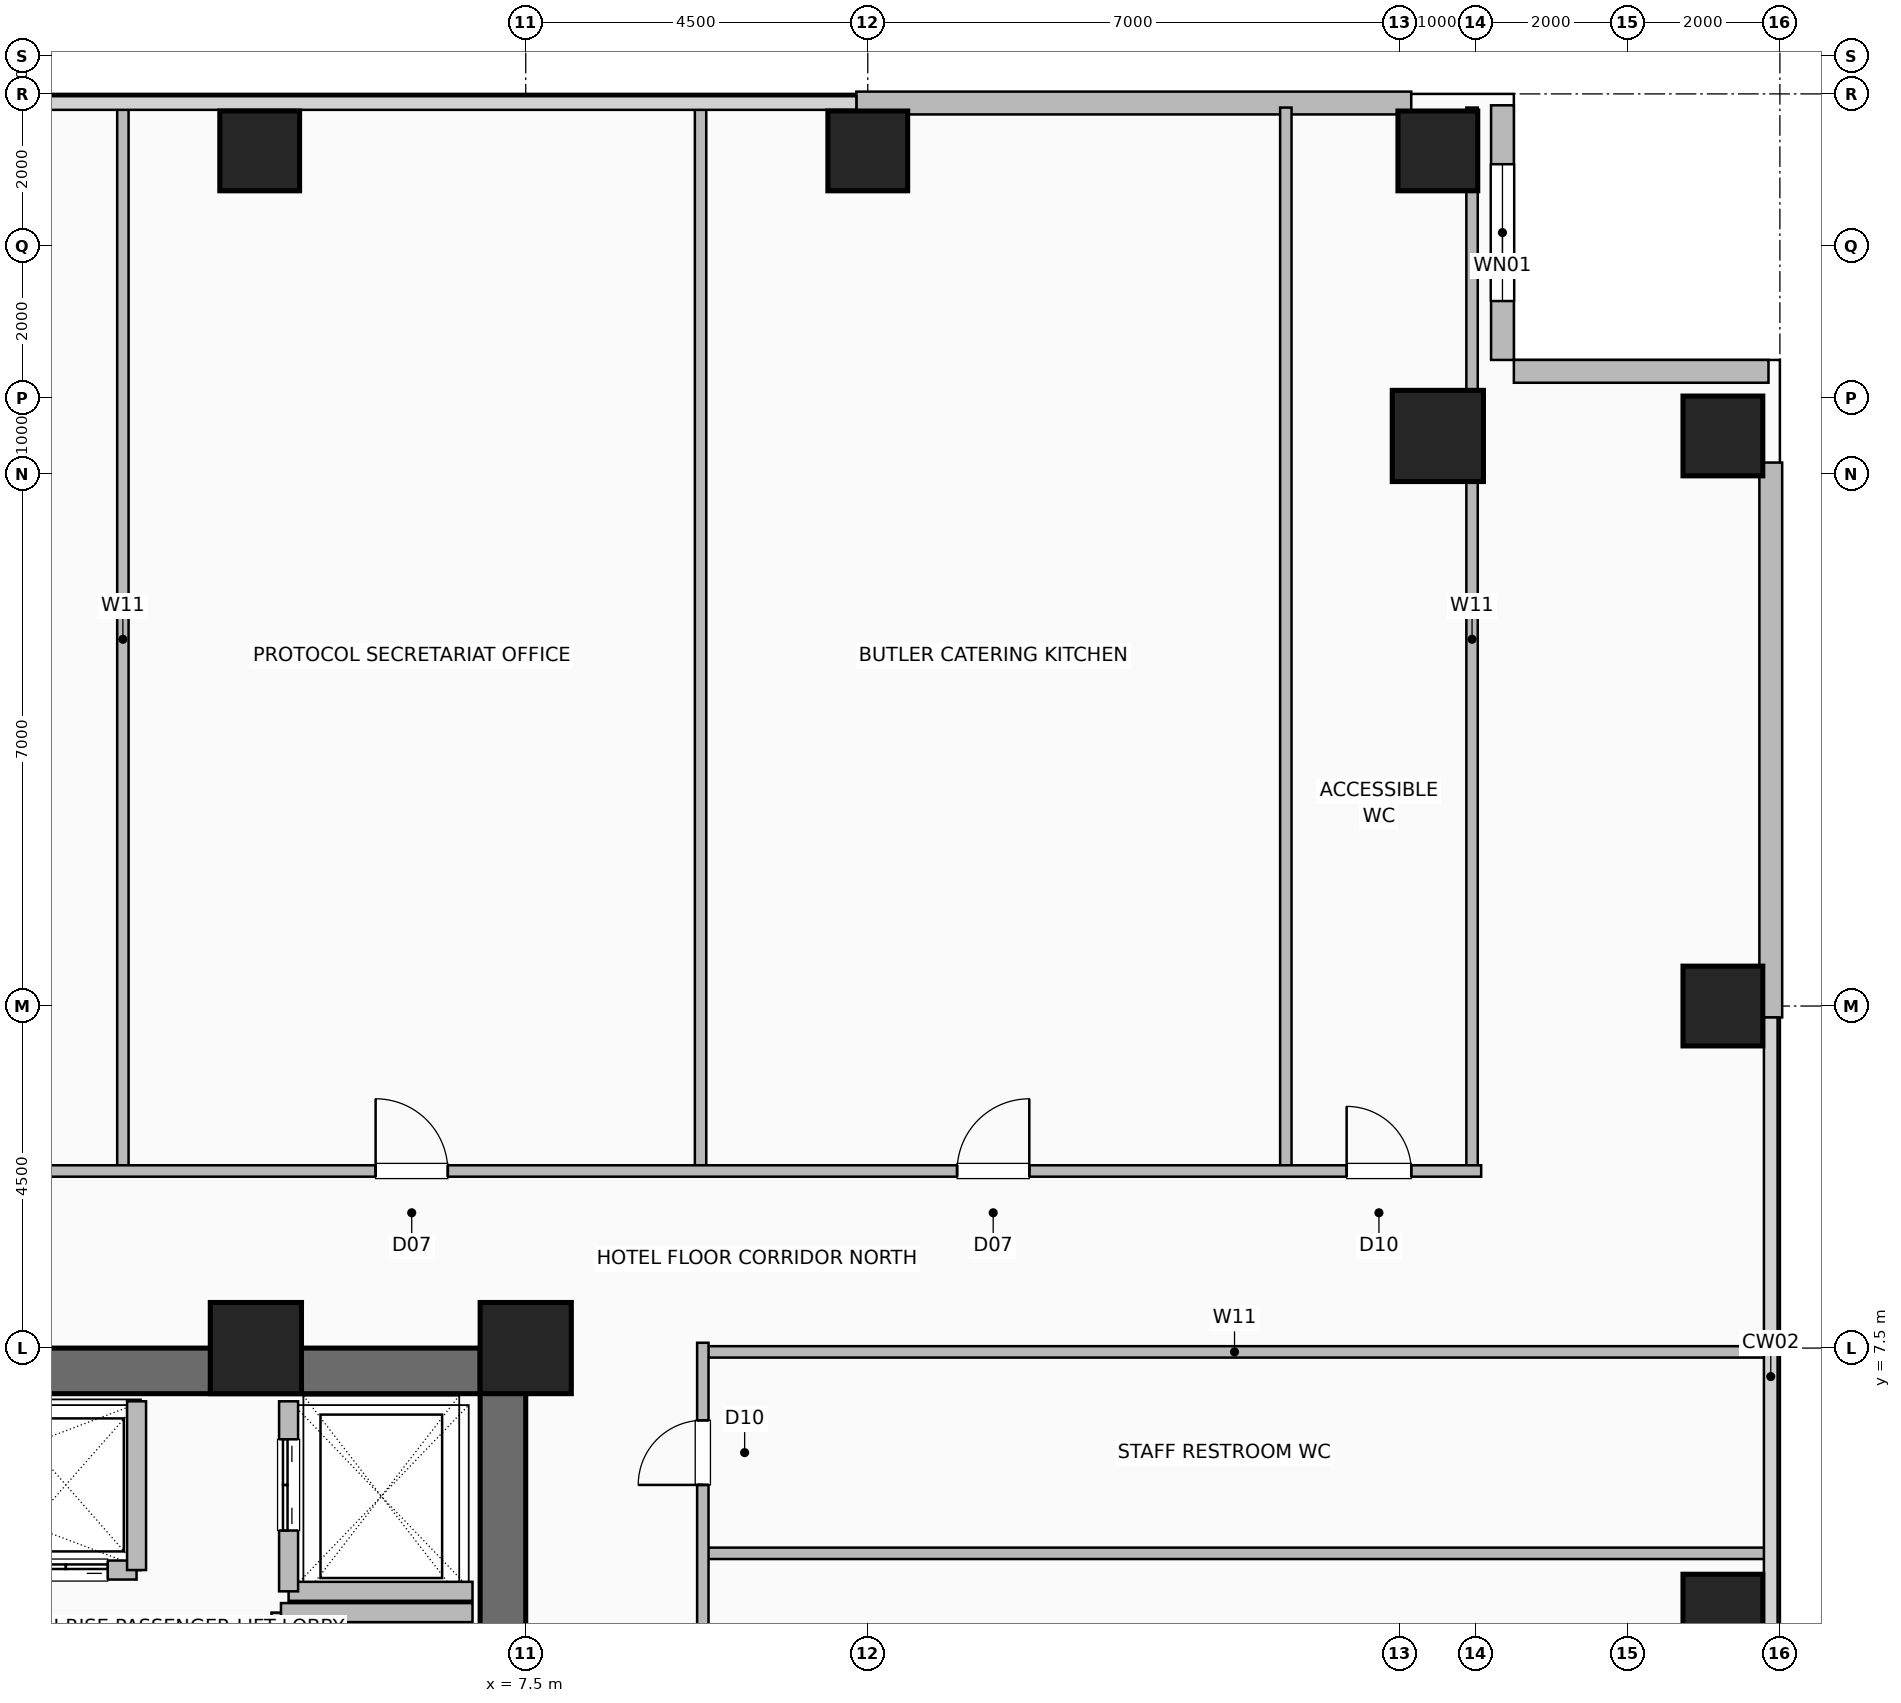
"""IFC4 building model, lengths in metres.
Left out: names, types, materials, properties, quantities, classifications, styles, units other than length and angle.
Written with IfcOpenShell. Run it as: python <this file> out.ifc"""

import sys

from ifc_helpers import new_model, si_unit, direction, frame, frame_2d, origin, origin_2d, place, context, subcontext, project, spatial, rectangle, hollow_rectangle, extrude, element, fill, save


model = new_model("IFC4")
c1 = context("Model", 3, precision=1e-05, world=origin(), true_north=direction((0.0, 1.0)))
c2 = subcontext(c1, "Body", "Model", "MODEL_VIEW")
j1 = project(units=[si_unit("LENGTHUNIT", "METRE"), si_unit("PLANEANGLEUNIT", "RADIAN")], contexts=[c1])
p1 = place(None, origin())
s1 = spatial("IfcSite", under=j1, at=p1, CompositionType="ELEMENT")
p2 = place(p1, origin())
s2 = spatial("IfcBuilding", under=s1, at=p2, CompositionType="ELEMENT")
p3 = place(p2, frame((0.0, 0.0, 76.0)))
s3 = spatial("IfcBuildingStorey", under=s2, at=p3, CompositionType="ELEMENT", Elevation=76.0)
for number, where, z_axis, x_axis in (
    (1, (7.5, 7.5, 0.0), (0.0, 0.0, 1.0), (1.0, 0.0, 0.0)),
    (2, (3.95, 7.5, 0.0), (0.0, 0.0, 1.0), (1.0, 0.0, 0.0)),
):
    element("IfcColumn", number, at=place(p3, frame(where, z_axis=z_axis, x_axis=x_axis)), inside=s3, PredefinedType="COLUMN", context=c2, shape_type="SweptSolid", body=[
        extrude(hollow_rectangle(XDim=1.2, YDim=1.2, WallThickness=0.055, at=origin_2d()), origin(), (0.0, 0.0, 1.0), 3.5),
    ])
for number, where, z_axis, x_axis in (
    (3, (4.0, 23.25, 0.0), (0.0, 0.0, 1.0), (1.0, 0.0, 0.0)),
    (4, (23.25, 4.0, 0.0), (0.0, 0.0, 1.0), (1.0, 0.0, 0.0)),
    (5, (12.0, 23.25, 0.0), (0.0, 0.0, 1.0), (1.0, 0.0, 0.0)),
    (6, (23.25, 12.0, 0.0), (0.0, 0.0, 1.0), (1.0, 0.0, 0.0)),
    (7, (19.5, 23.25, 0.0), (0.0, 0.0, 1.0), (1.0, 0.0, 0.0)),
    (8, (23.25, 19.5, 0.0), (0.0, 0.0, 1.0), (1.0, 0.0, 0.0)),
):
    element("IfcColumn", number, at=place(p3, frame(where, z_axis=z_axis, x_axis=x_axis)), inside=s3, PredefinedType="COLUMN", context=c2, shape_type="SweptSolid", body=[
        extrude(hollow_rectangle(XDim=1.05, YDim=1.05, WallThickness=0.05, at=origin_2d()), origin(), (0.0, 0.0, 1.0), 3.5),
    ])
p4 = place(p3, frame((19.5, 19.5, 0.0), z_axis=(0.0, 0.0, 1.0), x_axis=(1.0, 0.0, 0.0)))
e9 = element("IfcColumn", 9, at=p4, inside=s3, PredefinedType="COLUMN", context=c2, shape_type="SweptSolid", body=[
    extrude(hollow_rectangle(XDim=1.2, YDim=1.2, WallThickness=0.055, at=origin_2d()), origin(), (0.0, 0.0, 1.0), 3.5),
])
for number, where, z_axis, x_axis in (
    (10, (11.85, 23.88, 0.0), (0.0, 0.0, 1.0), (1.0, 0.0, 0.0)),
    (11, (23.88, 11.85, 0.0), (0.0, 0.0, 1.0), (0.0, 1.0, 0.0)),
):
    element("IfcWall", number, at=place(p3, frame(where, z_axis=z_axis, x_axis=x_axis)), inside=s3, PredefinedType="SOLIDWALL", context=c2, shape_type="SweptSolid", body=[
        extrude(rectangle(XDim=7.3, YDim=0.3, at=frame_2d((3.65, 0.0))), origin(), (0.0, 0.0, 1.0), 3.25),
    ])
p5 = place(p3, frame((20.35, 23.85, 0.0), z_axis=(0.0, 0.0, 1.0), x_axis=(0.0, -1.0, 0.0)))
e12 = element("IfcWall", 12, at=p5, inside=s3, PredefinedType="SOLIDWALL", context=c2, shape_type="SweptSolid", body=[
    extrude(rectangle(XDim=3.35, YDim=0.3, at=frame_2d((1.675, 0.0))), origin(), (0.0, 0.0, 1.0), 3.25),
])
p6 = place(p5, frame((0.775, 0.0, 0.9)))
e13 = element("IfcOpeningElement", 13, at=p6, cuts=e12, PredefinedType="OPENING", context=c2, shape_type="SweptSolid", body=[
    extrude(rectangle(XDim=1.8, YDim=1.8, at=frame_2d((0.9, 0.9))), frame((0.0, 0.16, 0.0), z_axis=(0.0, -1.0, 0.0), x_axis=(1.0, 0.0, 0.0)), (0.0, 0.0, 1.0), 0.32),
])
p7 = place(p3, frame((23.85, 20.35, 0.0), z_axis=(0.0, 0.0, 1.0), x_axis=(-1.0, 0.0, 0.0)))
e14 = element("IfcWall", 14, at=p7, inside=s3, PredefinedType="SOLIDWALL", context=c2, shape_type="SweptSolid", body=[
    extrude(rectangle(XDim=3.35, YDim=0.3, at=frame_2d((1.675, 0.0))), origin(), (0.0, 0.0, 1.0), 3.25),
])
for number, where, z_axis, x_axis in (
    (15, (-7.5, 7.2, 0.0), (0.0, 0.0, 1.0), (1.0, 0.0, 0.0)),
    (16, (7.2, -7.5, 0.0), (0.0, 0.0, 1.0), (0.0, 1.0, 0.0)),
):
    element("IfcWall", number, at=place(p3, frame(where, z_axis=z_axis, x_axis=x_axis)), inside=s3, PredefinedType="SHEAR", context=c2, shape_type="SweptSolid", body=[
        extrude(rectangle(XDim=15.0, YDim=0.6, at=frame_2d((7.5, 0.0))), origin(), (0.0, 0.0, 1.0), 3.25),
    ])
p8 = place(p3, frame((-3.26, 4.58, 0.0), z_axis=(0.0, 0.0, 1.0), x_axis=(1.0, 0.0, 0.0)))
e17 = element("IfcWall", 17, at=p8, inside=s3, PredefinedType="SHEAR", context=c2, shape_type="SweptSolid", body=[
    extrude(rectangle(XDim=5.64, YDim=0.25, at=frame_2d((2.82, 0.0))), origin(), (0.0, 0.0, 1.0), 3.25),
])
p9 = place(p8, frame((0.4, 0.0, 0.0)))
e18 = element("IfcOpeningElement", 18, at=p9, cuts=e17, PredefinedType="OPENING", context=c2, shape_type="SweptSolid", body=[
    extrude(rectangle(XDim=1.1, YDim=2.2, at=frame_2d((0.55, 1.1))), frame((0.0, 0.135, 0.0), z_axis=(0.0, -1.0, 0.0), x_axis=(1.0, 0.0, 0.0)), (0.0, 0.0, 1.0), 0.27),
])
p10 = place(p8, frame((2.28, 0.0, 0.0)))
e19 = element("IfcOpeningElement", 19, at=p10, cuts=e17, PredefinedType="OPENING", context=c2, shape_type="SweptSolid", body=[
    extrude(rectangle(XDim=1.1, YDim=2.2, at=frame_2d((0.55, 1.1))), frame((0.0, 0.135, 0.0), z_axis=(0.0, -1.0, 0.0), x_axis=(1.0, 0.0, 0.0)), (0.0, 0.0, 1.0), 0.27),
])
p11 = place(p8, frame((4.16, 0.0, 0.0)))
e20 = element("IfcOpeningElement", 20, at=p11, cuts=e17, PredefinedType="OPENING", context=c2, shape_type="SweptSolid", body=[
    extrude(rectangle(XDim=1.1, YDim=2.2, at=frame_2d((0.55, 1.1))), frame((0.0, 0.135, 0.0), z_axis=(0.0, -1.0, 0.0), x_axis=(1.0, 0.0, 0.0)), (0.0, 0.0, 1.0), 0.27),
])
p12 = place(p3, frame((2.38, 4.58, 0.0), z_axis=(0.0, 0.0, 1.0), x_axis=(0.0, 1.0, 0.0)))
e21 = element("IfcWall", 21, at=p12, inside=s3, PredefinedType="SHEAR", context=c2, shape_type="SweptSolid", body=[
    extrude(rectangle(XDim=2.22, YDim=0.25, at=frame_2d((1.11, 0.0))), origin(), (0.0, 0.0, 1.0), 3.25),
])
p13 = place(p3, frame((4.38, 4.3, 0.0), z_axis=(0.0, 0.0, 1.0), x_axis=(1.0, 0.0, 0.0)))
e22 = element("IfcWall", 22, at=p13, inside=s3, PredefinedType="SHEAR", context=c2, shape_type="SweptSolid", body=[
    extrude(rectangle(XDim=2.42, YDim=0.25, at=frame_2d((1.21, 0.0))), origin(), (0.0, 0.0, 1.0), 3.25),
])
p14 = place(p3, frame((4.38, 4.3, 0.0), z_axis=(0.0, 0.0, 1.0), x_axis=(0.0, 1.0, 0.0)))
e23 = element("IfcWall", 23, at=p14, inside=s3, PredefinedType="SHEAR", context=c2, shape_type="SweptSolid", body=[
    extrude(rectangle(XDim=2.5, YDim=0.25, at=frame_2d((1.25, 0.0))), origin(), (0.0, 0.0, 1.0), 3.25),
])
p15 = place(p14, frame((0.8, 0.0, 0.0)))
e24 = element("IfcOpeningElement", 24, at=p15, cuts=e23, PredefinedType="OPENING", context=c2, shape_type="SweptSolid", body=[
    extrude(rectangle(XDim=1.2, YDim=2.2, at=frame_2d((0.6, 1.1))), frame((0.0, 0.135, 0.0), z_axis=(0.0, -1.0, 0.0), x_axis=(1.0, 0.0, 0.0)), (0.0, 0.0, 1.0), 0.27),
])
p16 = place(p3, frame((4.28, 1.12, 0.0), z_axis=(0.0, 0.0, 1.0), x_axis=(0.0, 1.0, 0.0)))
e25 = element("IfcWall", 25, at=p16, inside=s3, PredefinedType="SHEAR", context=c2, shape_type="SweptSolid", body=[
    extrude(rectangle(XDim=2.9, YDim=0.25, at=frame_2d((1.45, 0.0))), origin(), (0.0, 0.0, 1.0), 3.25),
])
p17 = place(p16, frame((0.75, 0.0, 0.0)))
e26 = element("IfcOpeningElement", 26, at=p17, cuts=e25, PredefinedType="OPENING", context=c2, shape_type="SweptSolid", body=[
    extrude(rectangle(XDim=1.3, YDim=2.3, at=frame_2d((0.65, 1.15))), frame((0.0, 0.135, 0.0), z_axis=(0.0, -1.0, 0.0), x_axis=(1.0, 0.0, 0.0)), (0.0, 0.0, 1.0), 0.27),
])
p18 = place(p3, frame((4.28, 4.02, 0.0), z_axis=(0.0, 0.0, 1.0), x_axis=(1.0, 0.0, 0.0)))
e27 = element("IfcWall", 27, at=p18, inside=s3, PredefinedType="SHEAR", context=c2, shape_type="SweptSolid", body=[
    extrude(rectangle(XDim=2.52, YDim=0.25, at=frame_2d((1.26, 0.0))), origin(), (0.0, 0.0, 1.0), 3.25),
])
for number, where, z_axis, x_axis in (
    (28, (2.2, 9.83, 0.0), (0.0, 0.0, 1.0), (0.0, 1.0, 0.0)),
    (29, (9.8, 9.83, 0.0), (0.0, 0.0, 1.0), (0.0, 1.0, 0.0)),
    (30, (17.5, 9.83, 0.0), (0.0, 0.0, 1.0), (0.0, 1.0, 0.0)),
    (31, (19.95, 9.83, 0.0), (0.0, 0.0, 1.0), (0.0, 1.0, 0.0)),
):
    element("IfcWall", number, at=place(p3, frame(where, z_axis=z_axis, x_axis=x_axis)), inside=s3, PredefinedType="PARTITIONING", context=c2, shape_type="SweptSolid", body=[
        extrude(rectangle(XDim=13.99, YDim=0.15, at=frame_2d((6.995, 0.0))), origin(), (0.0, 0.0, 1.0), 3.25),
    ])
p19 = place(p3, frame((-20.07, 9.83, 0.0), z_axis=(0.0, 0.0, 1.0), x_axis=(1.0, 0.0, 0.0)))
e32 = element("IfcWall", 32, at=p19, inside=s3, PredefinedType="PARTITIONING", context=c2, shape_type="SweptSolid", body=[
    extrude(rectangle(XDim=40.14, YDim=0.15, at=frame_2d((20.07, 0.0))), origin(), (0.0, 0.0, 1.0), 3.25),
])
p20 = place(p19, frame((4.595, 0.0, 0.0)))
e33 = element("IfcOpeningElement", 33, at=p20, cuts=e32, PredefinedType="OPENING", context=c2, shape_type="SweptSolid", body=[
    extrude(rectangle(XDim=1.8, YDim=2.08, at=frame_2d((0.9, 1.04))), frame((0.0, 0.085, 0.0), z_axis=(0.0, -1.0, 0.0), x_axis=(1.0, 0.0, 0.0)), (0.0, 0.0, 1.0), 0.17),
])
p21 = place(p19, frame((15.67, 0.0, 0.0)))
e34 = element("IfcOpeningElement", 34, at=p21, cuts=e32, PredefinedType="OPENING", context=c2, shape_type="SweptSolid", body=[
    extrude(rectangle(XDim=1.8, YDim=2.08, at=frame_2d((0.9, 1.04))), frame((0.0, 0.085, 0.0), z_axis=(0.0, -1.0, 0.0), x_axis=(1.0, 0.0, 0.0)), (0.0, 0.0, 1.0), 0.17),
])
p22 = place(p19, frame((25.595, 0.0, 0.0)))
e35 = element("IfcOpeningElement", 35, at=p22, cuts=e32, PredefinedType="OPENING", context=c2, shape_type="SweptSolid", body=[
    extrude(rectangle(XDim=0.95, YDim=2.06, at=frame_2d((0.475, 1.03))), frame((0.0, 0.085, 0.0), z_axis=(0.0, -1.0, 0.0), x_axis=(1.0, 0.0, 0.0)), (0.0, 0.0, 1.0), 0.17),
])
p23 = place(p19, frame((33.245, 0.0, 0.0)))
e36 = element("IfcOpeningElement", 36, at=p23, cuts=e32, PredefinedType="OPENING", context=c2, shape_type="SweptSolid", body=[
    extrude(rectangle(XDim=0.95, YDim=2.06, at=frame_2d((0.475, 1.03))), frame((0.0, 0.085, 0.0), z_axis=(0.0, -1.0, 0.0), x_axis=(1.0, 0.0, 0.0)), (0.0, 0.0, 1.0), 0.17),
])
p24 = place(p19, frame((38.37, 0.0, 0.0)))
e37 = element("IfcOpeningElement", 37, at=p24, cuts=e32, PredefinedType="OPENING", context=c2, shape_type="SweptSolid", body=[
    extrude(rectangle(XDim=0.85, YDim=2.05, at=frame_2d((0.425, 1.025))), frame((0.0, 0.085, 0.0), z_axis=(0.0, -1.0, 0.0), x_axis=(1.0, 0.0, 0.0)), (0.0, 0.0, 1.0), 0.17),
])
for number, where, z_axis, x_axis in (
    (38, (9.83, 4.8, 0.0), (0.0, 0.0, 1.0), (1.0, 0.0, 0.0)),
    (39, (9.83, 7.45, 0.0), (0.0, 0.0, 1.0), (1.0, 0.0, 0.0)),
):
    element("IfcWall", number, at=place(p3, frame(where, z_axis=z_axis, x_axis=x_axis)), inside=s3, PredefinedType="PARTITIONING", context=c2, shape_type="SweptSolid", body=[
        extrude(rectangle(XDim=13.99, YDim=0.15, at=frame_2d((6.995, 0.0))), origin(), (0.0, 0.0, 1.0), 3.25),
    ])
p25 = place(p3, frame((9.83, -7.57, 0.0), z_axis=(0.0, 0.0, 1.0), x_axis=(0.0, 1.0, 0.0)))
e40 = element("IfcWall", 40, at=p25, inside=s3, PredefinedType="PARTITIONING", context=c2, shape_type="SweptSolid", body=[
    extrude(rectangle(XDim=15.14, YDim=0.15, at=frame_2d((7.57, 0.0))), origin(), (0.0, 0.0, 1.0), 3.25),
])
p26 = place(p25, frame((2.27, 0.0, 0.0)))
e41 = element("IfcOpeningElement", 41, at=p26, cuts=e40, PredefinedType="OPENING", context=c2, shape_type="SweptSolid", body=[
    extrude(rectangle(XDim=0.95, YDim=2.06, at=frame_2d((0.475, 1.03))), frame((0.0, 0.085, 0.0), z_axis=(0.0, -1.0, 0.0), x_axis=(1.0, 0.0, 0.0)), (0.0, 0.0, 1.0), 0.17),
])
p27 = place(p25, frame((8.395, 0.0, 0.0)))
e42 = element("IfcOpeningElement", 42, at=p27, cuts=e40, PredefinedType="OPENING", context=c2, shape_type="SweptSolid", body=[
    extrude(rectangle(XDim=0.95, YDim=2.06, at=frame_2d((0.475, 1.03))), frame((0.0, 0.085, 0.0), z_axis=(0.0, -1.0, 0.0), x_axis=(1.0, 0.0, 0.0)), (0.0, 0.0, 1.0), 0.17),
])
p28 = place(p25, frame((13.27, 0.0, 0.0)))
e43 = element("IfcOpeningElement", 43, at=p28, cuts=e40, PredefinedType="OPENING", context=c2, shape_type="SweptSolid", body=[
    extrude(rectangle(XDim=0.85, YDim=2.05, at=frame_2d((0.425, 1.025))), frame((0.0, 0.085, 0.0), z_axis=(0.0, -1.0, 0.0), x_axis=(1.0, 0.0, 0.0)), (0.0, 0.0, 1.0), 0.17),
])
p29 = place(p6, origin())
e44 = element("IfcWindow", 44, at=p29, inside=s3, PartitioningType="SINGLE_PANEL", PredefinedType="WINDOW", context=c2, shape_type="SweptSolid", body=[
    extrude(rectangle(XDim=1.8, YDim=1.8, at=frame_2d((0.9, 0.9))), frame((0.0, 0.03, 0.0), z_axis=(0.0, -1.0, 0.0), x_axis=(1.0, 0.0, 0.0)), (0.0, 0.0, 1.0), 0.06),
])
fill(e13, e44)
p30 = place(p11, origin())
e45 = element("IfcDoor", 45, at=p30, inside=s3, OperationType="DOUBLE_DOOR_SLIDING", PredefinedType="DOOR", context=c2, shape_type="SweptSolid", body=[
    extrude(rectangle(XDim=1.1, YDim=2.2, at=frame_2d((0.55, 1.1))), frame((0.0, 0.025, 0.0), z_axis=(0.0, -1.0, 0.0), x_axis=(1.0, 0.0, 0.0)), (0.0, 0.0, 1.0), 0.05),
])
fill(e20, e45)
p31 = place(p15, origin())
e46 = element("IfcDoor", 46, at=p31, inside=s3, OperationType="DOUBLE_DOOR_SLIDING", PredefinedType="DOOR", context=c2, shape_type="SweptSolid", body=[
    extrude(rectangle(XDim=1.2, YDim=2.2, at=frame_2d((0.6, 1.1))), frame((0.0, 0.025, 0.0), z_axis=(0.0, -1.0, 0.0), x_axis=(1.0, 0.0, 0.0)), (0.0, 0.0, 1.0), 0.05),
])
fill(e24, e46)
p32 = place(p22, origin())
e47 = element("IfcDoor", 47, at=p32, inside=s3, OperationType="SINGLE_SWING_LEFT", PredefinedType="DOOR", context=c2, shape_type="SweptSolid", body=[
    extrude(rectangle(XDim=0.95, YDim=2.06, at=frame_2d((0.475, 1.03))), frame((0.0, 0.025, 0.0), z_axis=(0.0, -1.0, 0.0), x_axis=(1.0, 0.0, 0.0)), (0.0, 0.0, 1.0), 0.05),
])
fill(e35, e47)
p33 = place(p23, origin())
e48 = element("IfcDoor", 48, at=p33, inside=s3, OperationType="SINGLE_SWING_RIGHT", PredefinedType="DOOR", context=c2, shape_type="SweptSolid", body=[
    extrude(rectangle(XDim=0.95, YDim=2.06, at=frame_2d((0.475, 1.03))), frame((0.0, 0.025, 0.0), z_axis=(0.0, -1.0, 0.0), x_axis=(1.0, 0.0, 0.0)), (0.0, 0.0, 1.0), 0.05),
])
fill(e36, e48)
p34 = place(p24, origin())
e49 = element("IfcDoor", 49, at=p34, inside=s3, OperationType="SINGLE_SWING_LEFT", PredefinedType="DOOR", context=c2, shape_type="SweptSolid", body=[
    extrude(rectangle(XDim=0.85, YDim=2.05, at=frame_2d((0.425, 1.025))), frame((0.0, 0.025, 0.0), z_axis=(0.0, -1.0, 0.0), x_axis=(1.0, 0.0, 0.0)), (0.0, 0.0, 1.0), 0.05),
])
fill(e37, e49)
p35 = place(p28, origin())
e50 = element("IfcDoor", 50, at=p35, inside=s3, OperationType="SINGLE_SWING_LEFT", PredefinedType="DOOR", context=c2, shape_type="SweptSolid", body=[
    extrude(rectangle(XDim=0.85, YDim=2.05, at=frame_2d((0.425, 1.025))), frame((0.0, 0.025, 0.0), z_axis=(0.0, -1.0, 0.0), x_axis=(1.0, 0.0, 0.0)), (0.0, 0.0, 1.0), 0.05),
])
fill(e43, e50)
save(model, sys.argv[1])
